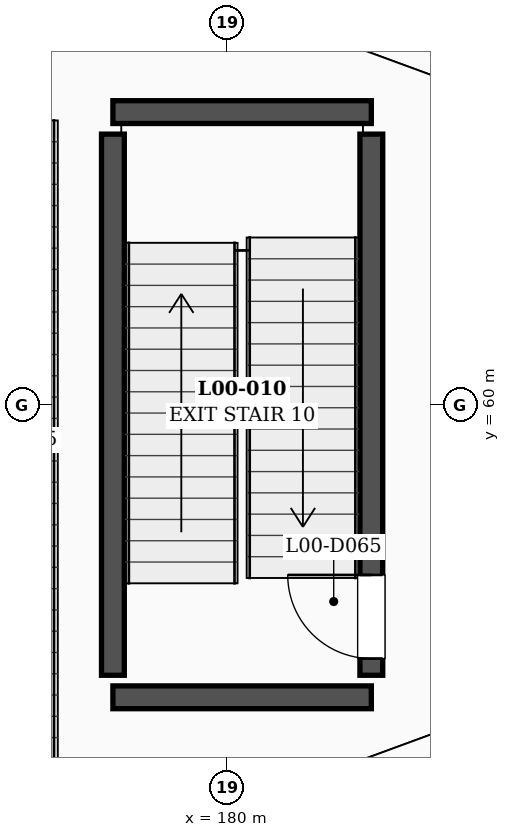
"""IFC4 building model, lengths in metres.
Left out: names, types, materials, properties, quantities, classifications, styles, units other than length and angle.
Written with IfcOpenShell. Run it as: python <this file> out.ifc"""

import sys

from ifc_helpers import new_model, si_unit, direction, frame, frame_2d, origin, place, context, subcontext, project, spatial, rectangle, extrude, element, fill, save


model = new_model("IFC4")
c1 = context("Model", 3, precision=1e-05, world=origin(), true_north=direction((0.0, 1.0)))
c2 = subcontext(c1, "Body", "Model", "MODEL_VIEW")
j1 = project(units=[si_unit("LENGTHUNIT", "METRE"), si_unit("PLANEANGLEUNIT", "RADIAN")], contexts=[c1])
p1 = place(None, origin())
s1 = spatial("IfcSite", under=j1, at=p1, CompositionType="ELEMENT")
p2 = place(p1, origin())
s2 = spatial("IfcBuilding", under=s1, at=p2, CompositionType="ELEMENT")
p3 = place(p2, origin())
s3 = spatial("IfcBuildingStorey", under=s2, at=p3, CompositionType="ELEMENT", Elevation=0.0)
for number, where, z_axis, x_axis in (
    (1, (178.5, 56.15, 0.0), (0.0, 0.0, 1.0), (1.0, 0.0, 0.0)),
    (2, (178.5, 63.85, 0.0), (0.0, 0.0, 1.0), (1.0, 0.0, 0.0)),
):
    element("IfcWall", number, at=place(p3, frame(where, z_axis=z_axis, x_axis=x_axis)), inside=s3, PredefinedType="SHEAR", context=c2, shape_type="SweptSolid", body=[
        extrude(rectangle(XDim=3.4, YDim=0.3, at=frame_2d((1.7, 0.0))), origin(), (0.0, 0.0, 1.0), 6.0),
    ])
p4 = place(p3, frame((178.5, 56.44, 0.0), z_axis=(0.0, 0.0, 1.0), x_axis=(0.0, 1.0, 0.0)))
e3 = element("IfcWall", 3, at=p4, inside=s3, PredefinedType="SHEAR", context=c2, shape_type="SweptSolid", body=[
    extrude(rectangle(XDim=7.12, YDim=0.3, at=frame_2d((3.56, 0.0))), origin(), (0.0, 0.0, 1.0), 6.0),
])
p5 = place(p3, frame((181.9, 56.44, 0.0), z_axis=(0.0, 0.0, 1.0), x_axis=(0.0, 1.0, 0.0)))
e4 = element("IfcWall", 4, at=p5, inside=s3, PredefinedType="SHEAR", context=c2, shape_type="SweptSolid", body=[
    extrude(rectangle(XDim=7.12, YDim=0.3, at=frame_2d((3.56, 0.0))), origin(), (0.0, 0.0, 1.0), 6.0),
])
p6 = place(p5, frame((0.22, 0.0, 0.0)))
e5 = element("IfcOpeningElement", 5, at=p6, cuts=e4, PredefinedType="OPENING", context=c2, shape_type="SweptSolid", body=[
    extrude(rectangle(XDim=1.1, YDim=2.2, at=frame_2d((0.55, 1.1))), frame((0.0, 0.16, 0.0), z_axis=(0.0, -1.0, 0.0), x_axis=(1.0, 0.0, 0.0)), (0.0, 0.0, 1.0), 0.32),
])
p7 = place(p6, origin())
e6 = element("IfcDoor", 6, at=p7, inside=s3, OperationType="SINGLE_SWING_RIGHT", PredefinedType="DOOR", context=c2, shape_type="SweptSolid", body=[
    extrude(rectangle(XDim=1.1, YDim=2.2, at=frame_2d((0.55, 1.1))), frame((0.0, 0.025, 0.0), z_axis=(0.0, -1.0, 0.0), x_axis=(1.0, 0.0, 0.0)), (0.0, 0.0, 1.0), 0.05),
])
fill(e5, e6)
save(model, sys.argv[1])
